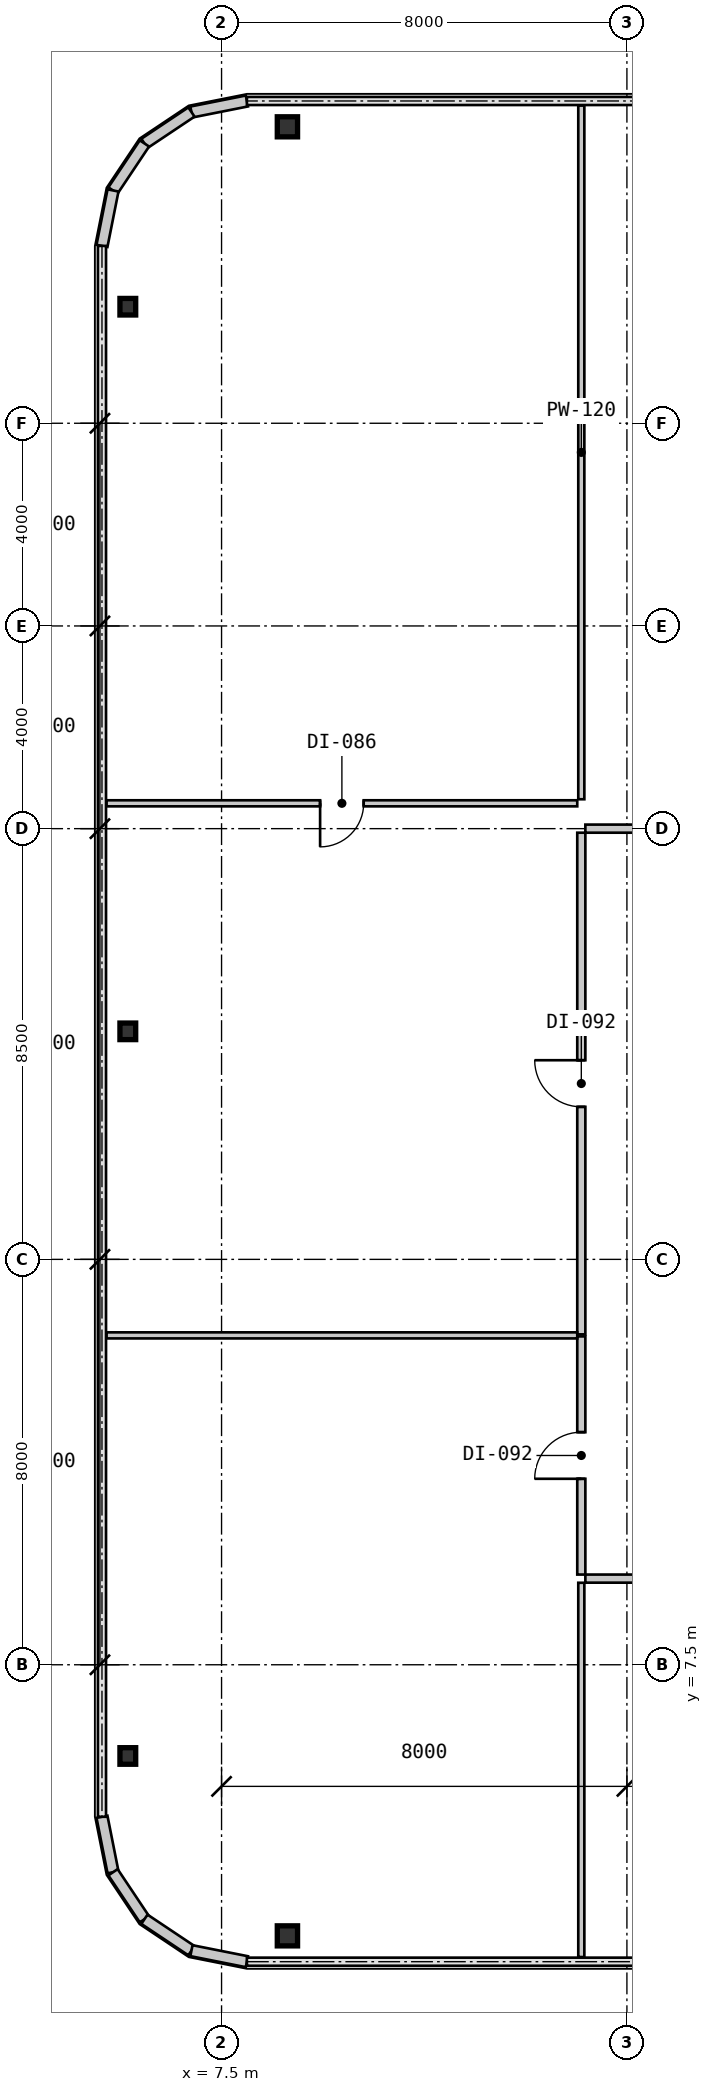
"""IFC4 building model, lengths in metres.
Left out: names, types, materials, properties, quantities, classifications, styles, units other than length and angle.
Written with IfcOpenShell. Run it as: python <this file> out.ifc"""

import sys

from ifc_helpers import new_model, si_unit, direction, frame, frame_2d, origin, origin_2d, place, context, subcontext, project, spatial, rectangle, i_section, extrude, source, transform, mapped, element, fill, save


model = new_model("IFC4")
c1 = context("Model", 3, precision=1e-05, world=origin(), true_north=direction((0.0, 1.0)))
c2 = subcontext(c1, "Body", "Model", "MODEL_VIEW")
j1 = project(units=[si_unit("LENGTHUNIT", "METRE"), si_unit("PLANEANGLEUNIT", "RADIAN")], contexts=[c1])
p1 = place(None, origin())
s1 = spatial("IfcSite", under=j1, at=p1, CompositionType="ELEMENT")
p2 = place(p1, origin())
s2 = spatial("IfcBuilding", under=s1, at=p2, CompositionType="ELEMENT")
p3 = place(p2, frame((0.0, 0.0, 38.85)))
s3 = spatial("IfcBuildingStorey", under=s2, at=p3, CompositionType="ELEMENT", Elevation=38.85)
m1 = source(origin(), c2, "Body", "SweptSolid", [
    extrude(i_section(OverallWidth=0.4, OverallDepth=0.396, WebThickness=0.022, FlangeThickness=0.034, at=origin_2d()), origin(), (0.0, 0.0, 1.0), 3.15),
])
for number, where, z_axis, x_axis in (
    (1, (8.8, 2.15, 0.0), (0.0, 0.0, 1.0), (1.0, 0.0, 0.0)),
    (2, (8.8, 37.85, 0.0), (0.0, 0.0, 1.0), (1.0, 0.0, 0.0)),
):
    element("IfcColumn", number, at=place(p3, frame(where, z_axis=z_axis, x_axis=x_axis)), inside=s3, PredefinedType="COLUMN", context=c2, shape_type="MappedRepresentation", body=[
        mapped(m1, transform((0.0, 0.0, 0.0), scale=1.0)),
    ])
m2 = source(origin(), c2, "Body", "SweptSolid", [
    extrude(i_section(OverallWidth=0.311, OverallDepth=0.327, WebThickness=0.016, FlangeThickness=0.025, at=origin_2d()), origin(), (0.0, 0.0, 1.0), 3.15),
])
for number, where, z_axis, x_axis in (
    (3, (5.65, 5.7, 0.0), (0.0, 0.0, 1.0), (1.0, 0.0, 0.0)),
    (4, (5.65, 20.0, 0.0), (0.0, 0.0, 1.0), (1.0, 0.0, 0.0)),
    (5, (5.65, 34.3, 0.0), (0.0, 0.0, 1.0), (1.0, 0.0, 0.0)),
):
    element("IfcColumn", number, at=place(p3, frame(where, z_axis=z_axis, x_axis=x_axis)), inside=s3, PredefinedType="COLUMN", context=c2, shape_type="MappedRepresentation", body=[
        mapped(m2, transform((0.0, 0.0, 0.0), scale=1.0)),
    ])
m3 = source(origin(), c2, "Body", "SweptSolid", [
    extrude(rectangle(XDim=1.116, YDim=0.22, at=frame_2d((0.558, 0.0))), origin(), (0.0, 0.0, 1.0), 2.93),
])
for number, where, z_axis, x_axis in (
    (6, (8.0, 38.36, 0.0), (0.0, 0.0, 1.0), (-0.981, -0.195, 0.0)),
    (7, (6.906, 38.142, 0.0), (0.0, 0.0, 1.0), (-0.831, -0.556, 0.0)),
    (8, (5.978, 37.522, 0.0), (0.0, 0.0, 1.0), (-0.556, -0.831, 0.0)),
    (9, (5.358, 36.594, 0.0), (0.0, 0.0, 1.0), (-0.195, -0.981, 0.0)),
    (10, (5.14, 4.5, 0.0), (0.0, 0.0, 1.0), (0.195, -0.981, 0.0)),
    (11, (5.358, 3.406, 0.0), (0.0, 0.0, 1.0), (0.556, -0.831, 0.0)),
    (12, (5.978, 2.478, 0.0), (0.0, 0.0, 1.0), (0.831, -0.556, 0.0)),
    (13, (6.906, 1.858, 0.0), (0.0, 0.0, 1.0), (0.981, -0.195, 0.0)),
):
    element("IfcWall", number, at=place(p3, frame(where, z_axis=z_axis, x_axis=x_axis)), inside=s3, PredefinedType="SOLIDWALL", context=c2, shape_type="MappedRepresentation", body=[
        mapped(m3, transform((0.0, 0.0, 0.0), scale=1.0)),
    ])
m4 = source(origin(), c2, "Body", "SweptSolid", [
    extrude(rectangle(XDim=2.04, YDim=0.16, at=frame_2d((1.02, 0.0))), origin(), (0.0, 0.0, 1.0), 2.93),
])
p4 = place(p3, frame((16.72, 9.2, 0.0), z_axis=(0.0, 0.0, 1.0), x_axis=(-1.0, 0.0, 0.0)))
e14 = element("IfcWall", 14, at=p4, inside=s3, PredefinedType="PARTITIONING", context=c2, shape_type="MappedRepresentation", body=[
    mapped(m4, transform((0.0, 0.0, 0.0), scale=1.0)),
])
m5 = source(origin(), c2, "Body", "SweptSolid", [
    extrude(rectangle(XDim=4.7, YDim=0.16, at=frame_2d((2.35, 0.0))), origin(), (0.0, 0.0, 1.0), 2.93),
])
p5 = place(p3, frame((14.6, 9.28, 0.0), z_axis=(0.0, 0.0, 1.0), x_axis=(0.0, 1.0, 0.0)))
e15 = element("IfcWall", 15, at=p5, inside=s3, PredefinedType="PARTITIONING", context=c2, shape_type="MappedRepresentation", body=[
    mapped(m5, transform((0.0, 0.0, 0.0), scale=1.0)),
])
m6 = source(origin(), c2, "Body", "SweptSolid", [
    extrude(rectangle(XDim=0.92, YDim=2.1, at=frame_2d((0.46, 1.05))), frame((0.0, 0.09, 0.0), z_axis=(0.0, -1.0, 0.0), x_axis=(1.0, 0.0, 0.0)), (0.0, 0.0, 1.0), 0.18),
])
p6 = place(p5, frame((1.89, 0.0, 0.0)))
e16 = element("IfcOpeningElement", 16, at=p6, cuts=e15, PredefinedType="OPENING", context=c2, shape_type="MappedRepresentation", body=[
    mapped(m6, transform((0.0, 0.0, 0.0), scale=1.0)),
])
m7 = source(origin(), c2, "Body", "SweptSolid", [
    extrude(rectangle(XDim=9.9, YDim=0.16, at=frame_2d((4.95, 0.0))), origin(), (0.0, 0.0, 1.0), 2.93),
])
p7 = place(p3, frame((14.6, 14.02, 0.0), z_axis=(0.0, 0.0, 1.0), x_axis=(0.0, 1.0, 0.0)))
e17 = element("IfcWall", 17, at=p7, inside=s3, PredefinedType="PARTITIONING", context=c2, shape_type="MappedRepresentation", body=[
    mapped(m7, transform((0.0, 0.0, 0.0), scale=1.0)),
])
p8 = place(p7, frame((4.49, 0.0, 0.0)))
e18 = element("IfcOpeningElement", 18, at=p8, cuts=e17, PredefinedType="OPENING", context=c2, shape_type="MappedRepresentation", body=[
    mapped(m6, transform((0.0, 0.0, 0.0), scale=1.0)),
])
m8 = source(origin(), c2, "Body", "SweptSolid", [
    extrude(rectangle(XDim=4.13, YDim=0.16, at=frame_2d((2.065, 0.0))), origin(), (0.0, 0.0, 1.0), 2.93),
])
p9 = place(p3, frame((14.68, 24.0, 0.0), z_axis=(0.0, 0.0, 1.0), x_axis=(1.0, 0.0, 0.0)))
e19 = element("IfcWall", 19, at=p9, inside=s3, PredefinedType="PARTITIONING", context=c2, shape_type="MappedRepresentation", body=[
    mapped(m8, transform((0.0, 0.0, 0.0), scale=1.0)),
])
p10 = place(p9, frame((1.69, 0.0, 0.0)))
e20 = element("IfcOpeningElement", 20, at=p10, cuts=e19, PredefinedType="OPENING", context=c2, shape_type="MappedRepresentation", body=[
    mapped(m6, transform((0.0, 0.0, 0.0), scale=1.0)),
])
m9 = source(origin(), c2, "Body", "SweptSolid", [
    extrude(rectangle(XDim=7.386, YDim=0.12, at=frame_2d((3.693, 0.0))), origin(), (0.0, 0.0, 1.0), 2.93),
])
p11 = place(p3, frame((14.6, 1.732, 0.0), z_axis=(0.0, 0.0, 1.0), x_axis=(0.0, 1.0, 0.0)))
e21 = element("IfcWall", 21, at=p11, inside=s3, PredefinedType="PARTITIONING", context=c2, shape_type="MappedRepresentation", body=[
    mapped(m9, transform((0.0, 0.0, 0.0), scale=1.0)),
])
m10 = source(origin(), c2, "Body", "SweptSolid", [
    extrude(rectangle(XDim=9.29, YDim=0.12, at=frame_2d((4.645, 0.0))), origin(), (0.0, 0.0, 1.0), 2.93),
])
p12 = place(p3, frame((5.23, 14.0, 0.0), z_axis=(0.0, 0.0, 1.0), x_axis=(1.0, 0.0, 0.0)))
e22 = element("IfcWall", 22, at=p12, inside=s3, PredefinedType="PARTITIONING", context=c2, shape_type="MappedRepresentation", body=[
    mapped(m10, transform((0.0, 0.0, 0.0), scale=1.0)),
])
p13 = place(p3, frame((5.23, 24.5, 0.0), z_axis=(0.0, 0.0, 1.0), x_axis=(1.0, 0.0, 0.0)))
e23 = element("IfcWall", 23, at=p13, inside=s3, PredefinedType="PARTITIONING", context=c2, shape_type="MappedRepresentation", body=[
    mapped(m10, transform((0.0, 0.0, 0.0), scale=1.0)),
])
m11 = source(origin(), c2, "Body", "SweptSolid", [
    extrude(rectangle(XDim=0.86, YDim=2.1, at=frame_2d((0.43, 1.05))), frame((0.0, 0.07, 0.0), z_axis=(0.0, -1.0, 0.0), x_axis=(1.0, 0.0, 0.0)), (0.0, 0.0, 1.0), 0.14),
])
p14 = place(p13, frame((4.215, 0.0, 0.0)))
e24 = element("IfcOpeningElement", 24, at=p14, cuts=e23, PredefinedType="OPENING", context=c2, shape_type="MappedRepresentation", body=[
    mapped(m11, transform((0.0, 0.0, 0.0), scale=1.0)),
])
m12 = source(origin(), c2, "Body", "SweptSolid", [
    extrude(rectangle(XDim=13.69, YDim=0.12, at=frame_2d((6.845, 0.0))), origin(), (0.0, 0.0, 1.0), 2.93),
])
p15 = place(p3, frame((14.6, 38.27, 0.0), z_axis=(0.0, 0.0, 1.0), x_axis=(0.0, -1.0, 0.0)))
e25 = element("IfcWall", 25, at=p15, inside=s3, PredefinedType="PARTITIONING", context=c2, shape_type="MappedRepresentation", body=[
    mapped(m12, transform((0.0, 0.0, 0.0), scale=1.0)),
])
m13 = source(origin(), c2, "Body", "SweptSolid", [
    extrude(rectangle(XDim=0.92, YDim=2.1, at=frame_2d((0.46, 1.05))), frame((0.0, 0.025, 0.0), z_axis=(0.0, -1.0, 0.0), x_axis=(1.0, 0.0, 0.0)), (0.0, 0.0, 1.0), 0.05),
])
p16 = place(p6, origin())
e26 = element("IfcDoor", 26, at=p16, inside=s3, OperationType="SINGLE_SWING_LEFT", PredefinedType="DOOR", context=c2, shape_type="MappedRepresentation", body=[
    mapped(m13, transform((0.0, 0.0, 0.0), scale=1.0)),
])
fill(e16, e26)
p17 = place(p8, origin())
e27 = element("IfcDoor", 27, at=p17, inside=s3, OperationType="SINGLE_SWING_RIGHT", PredefinedType="DOOR", context=c2, shape_type="MappedRepresentation", body=[
    mapped(m13, transform((0.0, 0.0, 0.0), scale=1.0)),
])
fill(e18, e27)
m14 = source(origin(), c2, "Body", "SweptSolid", [
    extrude(rectangle(XDim=0.86, YDim=2.1, at=frame_2d((0.43, 1.05))), frame((0.0, 0.025, 0.0), z_axis=(0.0, -1.0, 0.0), x_axis=(1.0, 0.0, 0.0)), (0.0, 0.0, 1.0), 0.05),
])
p18 = place(p14, frame((0.86, 0.0, 0.0), z_axis=(0.0, 0.0, 1.0), x_axis=(-1.0, 0.0, 0.0)))
e28 = element("IfcDoor", 28, at=p18, inside=s3, OperationType="SINGLE_SWING_RIGHT", PredefinedType="DOOR", context=c2, shape_type="MappedRepresentation", body=[
    mapped(m14, transform((0.0, 0.0, 0.0), scale=1.0)),
])
fill(e24, e28)
save(model, sys.argv[1])
